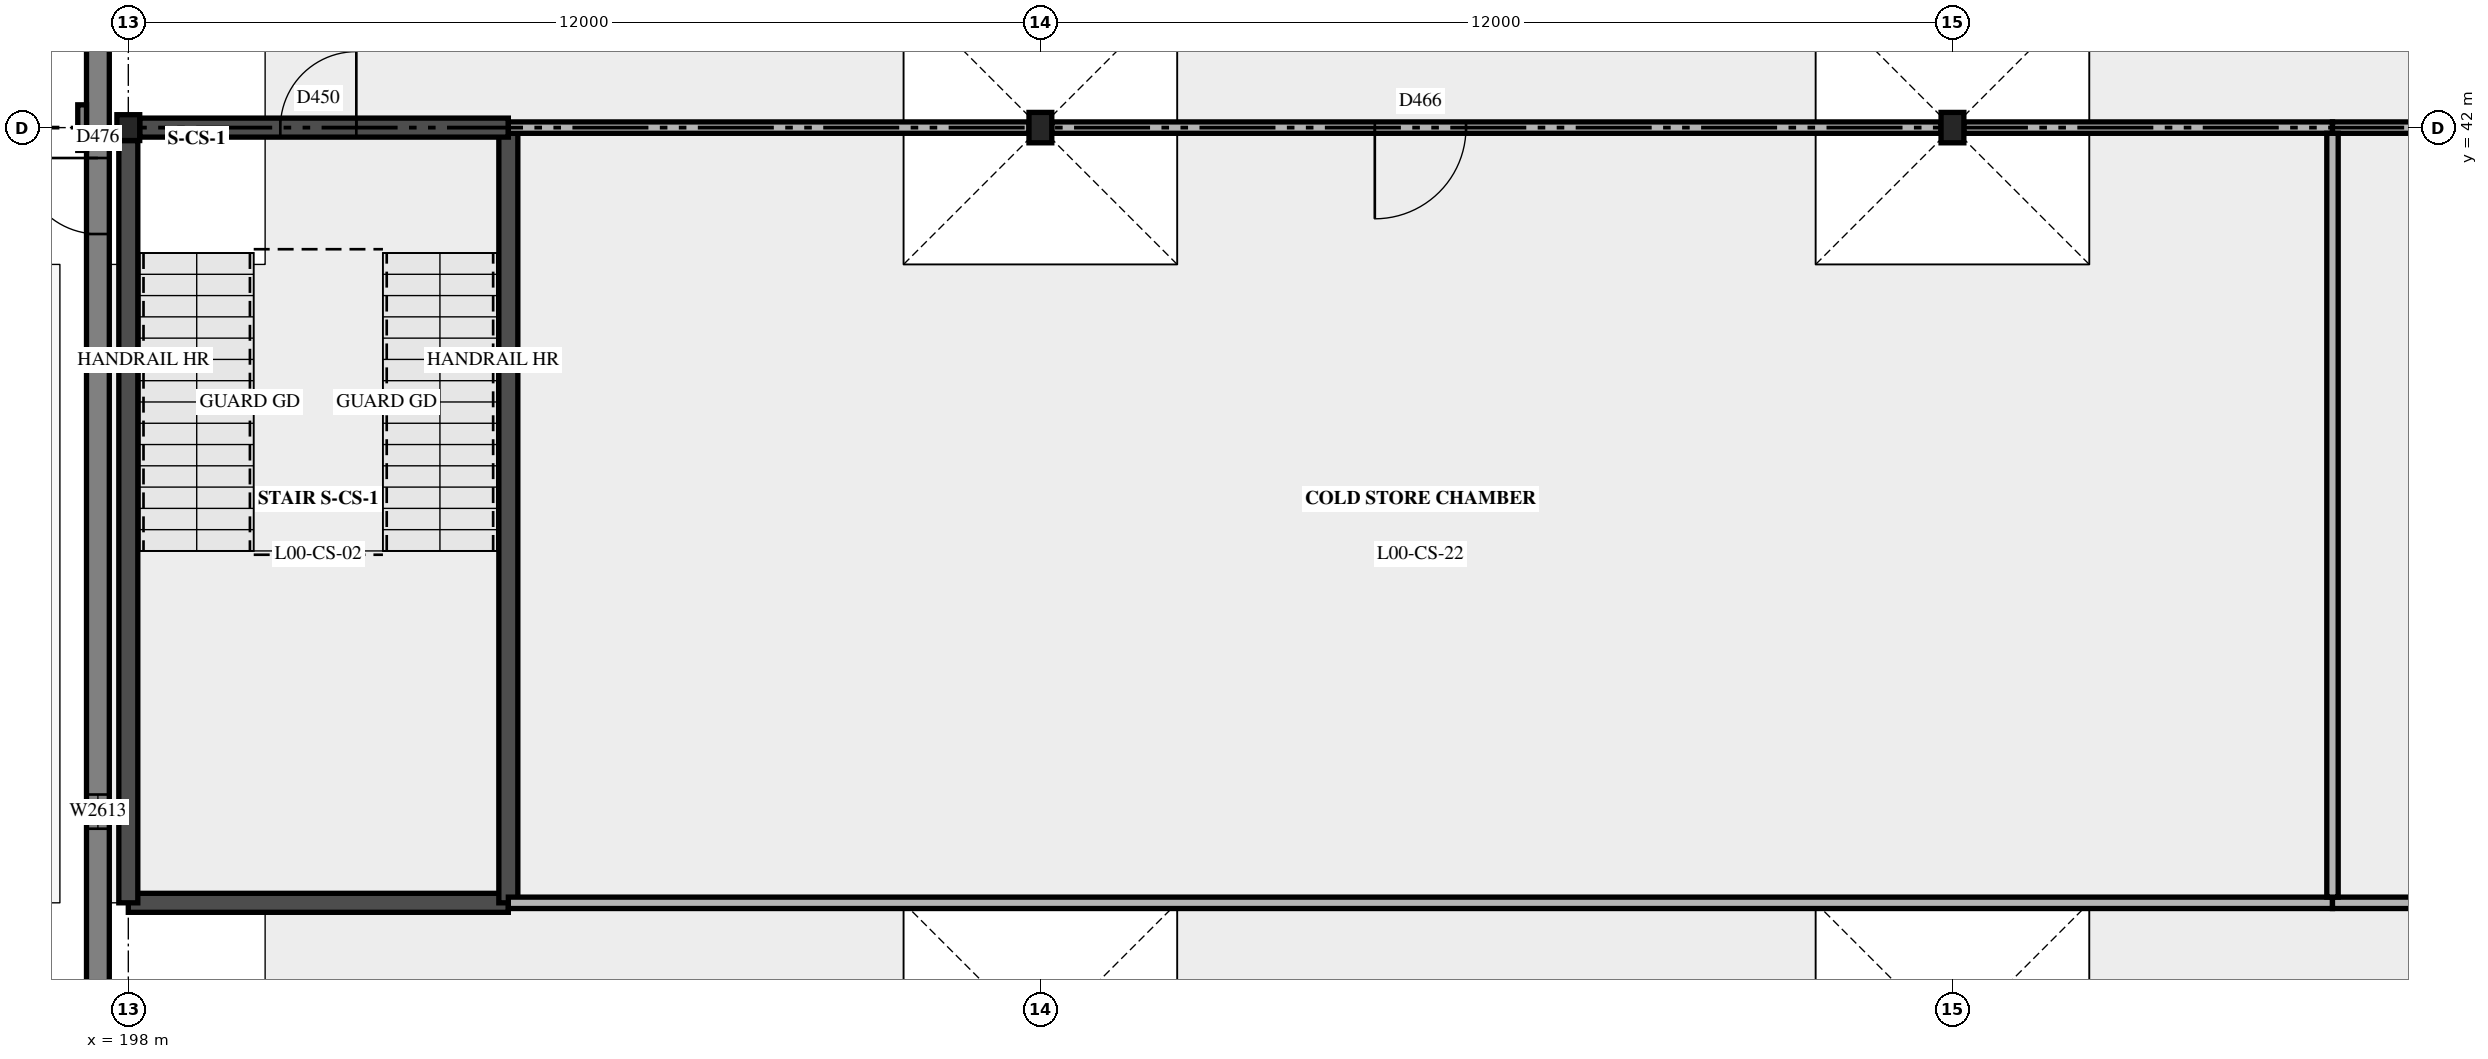
"""IFC4 building model, lengths in metres.
Left out: names, types, materials, properties, quantities, classifications, styles, units other than length and angle.
Written with IfcOpenShell. Run it as: python <this file> out.ifc"""

import sys

from ifc_helpers import new_model, si_unit, direction, frame, frame_2d, origin, origin_2d, place, context, subcontext, project, spatial, polyline, rectangle, i_section, outline, extrude, element, fill, save


model = new_model("IFC4")
c1 = context("Model", 3, precision=1e-05, world=origin(), true_north=direction((0.0, 1.0)))
c2 = subcontext(c1, "Body", "Model", "MODEL_VIEW")
j1 = project(units=[si_unit("LENGTHUNIT", "METRE"), si_unit("PLANEANGLEUNIT", "RADIAN")], contexts=[c1])
p1 = place(None, origin())
s1 = spatial("IfcSite", under=j1, at=p1, CompositionType="ELEMENT")
p2 = place(p1, origin())
s2 = spatial("IfcBuilding", under=s1, at=p2, CompositionType="ELEMENT")
p3 = place(p2, origin())
s3 = spatial("IfcBuildingStorey", under=s2, at=p3, CompositionType="ELEMENT", Elevation=0.0)
p4 = place(p3, frame((198.0, 42.0, 0.0), z_axis=(0.0, 0.0, 1.0), x_axis=(1.0, 0.0, 0.0)))
e1 = element("IfcColumn", 1, at=p4, inside=s3, PredefinedType="COLUMN", context=c2, shape_type="SweptSolid", body=[
    extrude(i_section(OverallWidth=0.3, OverallDepth=0.34, WebThickness=0.012, FlangeThickness=0.021, at=origin_2d()), origin(), (0.0, 0.0, 1.0), 5.4),
])
for number, where, z_axis, x_axis in (
    (2, (210.0, 42.0, 0.0), (0.0, 0.0, 1.0), (1.0, 0.0, 0.0)),
    (3, (222.0, 42.0, 0.0), (0.0, 0.0, 1.0), (1.0, 0.0, 0.0)),
):
    element("IfcColumn", number, at=place(p3, frame(where, z_axis=z_axis, x_axis=x_axis)), inside=s3, PredefinedType="COLUMN", context=c2, shape_type="SweptSolid", body=[
        extrude(i_section(OverallWidth=0.3, OverallDepth=0.4, WebThickness=0.013, FlangeThickness=0.024, at=origin_2d()), origin(), (0.0, 0.0, 1.0), 5.4),
    ])
p5 = place(p3, frame((198.0, 31.8, 0.0), z_axis=(0.0, 0.0, 1.0), x_axis=(1.0, 0.0, 0.0)))
e4 = element("IfcWall", 4, at=p5, inside=s3, PredefinedType="SHEAR", context=c2, shape_type="SweptSolid", body=[
    extrude(rectangle(XDim=5.0, YDim=0.25, at=frame_2d((2.5, 0.0))), origin(), (0.0, 0.0, 1.0), 5.4),
])
p6 = place(p3, frame((203.0, 31.8, 0.0), z_axis=(0.0, 0.0, 1.0), x_axis=(0.0, 1.0, 0.0)))
e5 = element("IfcWall", 5, at=p6, inside=s3, PredefinedType="SHEAR", context=c2, shape_type="SweptSolid", body=[
    extrude(rectangle(XDim=10.2, YDim=0.25, at=frame_2d((5.1, 0.0))), origin(), (0.0, 0.0, 1.0), 5.4),
])
p7 = place(p3, frame((198.15, 42.0, 0.0), z_axis=(0.0, 0.0, 1.0), x_axis=(1.0, 0.0, 0.0)))
e6 = element("IfcWall", 6, at=p7, inside=s3, PredefinedType="SHEAR", context=c2, shape_type="SweptSolid", body=[
    extrude(rectangle(XDim=4.85, YDim=0.25, at=frame_2d((2.425, 0.0))), origin(), (0.0, 0.0, 1.0), 5.4),
])
p8 = place(p7, frame((1.85, 0.0, 0.0)))
e7 = element("IfcOpeningElement", 7, at=p8, cuts=e6, PredefinedType="OPENING", context=c2, shape_type="SweptSolid", body=[
    extrude(rectangle(XDim=1.0, YDim=2.1, at=frame_2d((0.5, 1.05))), frame((0.0, 0.135, 0.0), z_axis=(0.0, -1.0, 0.0), x_axis=(1.0, 0.0, 0.0)), (0.0, 0.0, 1.0), 0.27),
])
p9 = place(p3, frame((198.0, 31.8, 0.0), z_axis=(0.0, 0.0, 1.0), x_axis=(0.0, 1.0, 0.0)))
e8 = element("IfcWall", 8, at=p9, inside=s3, PredefinedType="SHEAR", context=c2, shape_type="SweptSolid", body=[
    extrude(rectangle(XDim=10.03, YDim=0.25, at=frame_2d((5.015, 0.0))), origin(), (0.0, 0.0, 1.0), 5.4),
])
p10 = place(p9, frame((8.8, 0.0, 0.0)))
e9 = element("IfcOpeningElement", 9, at=p10, cuts=e8, PredefinedType="OPENING", context=c2, shape_type="SweptSolid", body=[
    extrude(rectangle(XDim=1.0, YDim=2.1, at=frame_2d((0.5, 1.05))), frame((0.0, 0.135, 0.0), z_axis=(0.0, -1.0, 0.0), x_axis=(1.0, 0.0, 0.0)), (0.0, 0.0, 1.0), 0.27),
])
p11 = place(p3, frame((197.6, 66.25, 0.0), z_axis=(0.0, 0.0, 1.0), x_axis=(0.0, -1.0, 0.0)))
e10 = element("IfcWall", 10, at=p11, inside=s3, PredefinedType="SOLIDWALL", context=c2, shape_type="SweptSolid", body=[
    extrude(rectangle(XDim=48.5, YDim=0.3, at=frame_2d((24.25, 0.0))), origin(), (0.0, 0.0, 1.0), 5.4),
])
p12 = place(p11, frame((25.65, 0.0, 0.0), z_axis=(0.0, 0.0, 1.0), x_axis=(-1.0, 0.0, 0.0)))
e11 = element("IfcOpeningElement", 11, at=p12, cuts=e10, PredefinedType="OPENING", context=c2, shape_type="SweptSolid", body=[
    extrude(rectangle(XDim=1.0, YDim=2.1, at=frame_2d((0.5, 1.05))), frame((0.0, 0.16, 0.0), z_axis=(0.0, -1.0, 0.0), x_axis=(1.0, 0.0, 0.0)), (0.0, 0.0, 1.0), 0.32),
])
p13 = place(p11, frame((37.85, 0.0, 0.0), z_axis=(0.0, 0.0, 1.0), x_axis=(-1.0, 0.0, 0.0)))
e12 = element("IfcOpeningElement", 12, at=p13, cuts=e10, PredefinedType="OPENING", context=c2, shape_type="SweptSolid", body=[
    extrude(rectangle(XDim=1.0, YDim=2.1, at=frame_2d((0.5, 1.05))), frame((0.0, 0.16, 0.0), z_axis=(0.0, -1.0, 0.0), x_axis=(1.0, 0.0, 0.0)), (0.0, 0.0, 1.0), 0.32),
])
p14 = place(p11, frame((9.025, 0.0, 1.8)))
e13 = element("IfcOpeningElement", 13, at=p14, cuts=e10, PredefinedType="OPENING", context=c2, shape_type="SweptSolid", body=[
    extrude(rectangle(XDim=0.45, YDim=2.4, at=frame_2d((0.225, 1.2))), frame((0.0, 0.16, 0.0), z_axis=(0.0, -1.0, 0.0), x_axis=(1.0, 0.0, 0.0)), (0.0, 0.0, 1.0), 0.32),
])
p15 = place(p11, frame((33.025, 0.0, 1.8)))
e14 = element("IfcOpeningElement", 14, at=p15, cuts=e10, PredefinedType="OPENING", context=c2, shape_type="SweptSolid", body=[
    extrude(rectangle(XDim=0.45, YDim=2.4, at=frame_2d((0.225, 1.2))), frame((0.0, 0.16, 0.0), z_axis=(0.0, -1.0, 0.0), x_axis=(1.0, 0.0, 0.0)), (0.0, 0.0, 1.0), 0.32),
])
p16 = place(p11, frame((45.025, 0.0, 1.8)))
e15 = element("IfcOpeningElement", 15, at=p16, cuts=e10, PredefinedType="OPENING", context=c2, shape_type="SweptSolid", body=[
    extrude(rectangle(XDim=0.45, YDim=2.4, at=frame_2d((0.225, 1.2))), frame((0.0, 0.16, 0.0), z_axis=(0.0, -1.0, 0.0), x_axis=(1.0, 0.0, 0.0)), (0.0, 0.0, 1.0), 0.32),
])
p17 = place(p3, frame((197.393, 42.3, 0.0), z_axis=(0.0, 0.0, 1.0), x_axis=(0.0, -1.0, 0.0)))
e16 = element("IfcWall", 16, at=p17, inside=s3, PredefinedType="SOLIDWALL", context=c2, shape_type="SweptSolid", body=[
    extrude(rectangle(XDim=0.6, YDim=0.115, at=frame_2d((0.3, 0.0))), origin(), (0.0, 0.0, 1.0), 5.4),
])
for number, where, z_axis, x_axis in (
    (17, (203.0, 31.8, 0.0), (0.0, 0.0, 1.0), (1.0, 0.0, 0.0)),
    (18, (227.0, 31.8, 0.0), (0.0, 0.0, 1.0), (1.0, 0.0, 0.0)),
):
    element("IfcWall", number, at=place(p3, frame(where, z_axis=z_axis, x_axis=x_axis)), inside=s3, PredefinedType="PARTITIONING", context=c2, shape_type="SweptSolid", body=[
        extrude(outline(polyline([(0.0, 0.0), (24.0, 0.0), (24.0, 5.15), (23.905, 5.15), (23.9, 4.63), (23.7, 4.63), (23.695, 5.15), (21.505, 5.15), (21.5, 4.63), (21.3, 4.63), (21.295, 5.15), (19.1, 5.15), (19.095, 4.68), (18.905, 4.68), (18.9, 5.15), (16.705, 5.15), (16.7, 4.63), (16.5, 4.63), (16.495, 5.15), (14.305, 5.15), (14.3, 4.63), (14.1, 4.63), (14.095, 5.15), (11.905, 5.15), (11.9, 4.63), (11.7, 4.63), (11.695, 5.15), (9.505, 5.15), (9.5, 4.63), (9.3, 4.63), (9.295, 5.15), (7.1, 5.15), (7.095, 4.68), (6.905, 4.68), (6.9, 5.15), (4.705, 5.15), (4.7, 4.63), (4.5, 4.63), (4.495, 5.15), (2.305, 5.15), (2.3, 4.63), (2.1, 4.63), (2.095, 5.15), (0.0, 5.15), (0.0, 0.0)])), frame((0.0, 0.075, 0.0), z_axis=(0.0, -1.0, 0.0), x_axis=(1.0, 0.0, 0.0)), (0.0, 0.0, 1.0), 0.15),
    ])
p18 = place(p3, frame((203.0, 42.0, 0.0), z_axis=(0.0, 0.0, 1.0), x_axis=(1.0, 0.0, 0.0)))
e19 = element("IfcWall", 19, at=p18, inside=s3, PredefinedType="PARTITIONING", context=c2, shape_type="SweptSolid", body=[
    extrude(rectangle(XDim=6.85, YDim=0.15, at=frame_2d((3.425, 0.0))), origin(), (0.0, 0.0, 1.0), 4.63),
])
p19 = place(p3, frame((210.15, 42.0, 0.0), z_axis=(0.0, 0.0, 1.0), x_axis=(1.0, 0.0, 0.0)))
e20 = element("IfcWall", 20, at=p19, inside=s3, PredefinedType="PARTITIONING", context=c2, shape_type="SweptSolid", body=[
    extrude(rectangle(XDim=11.7, YDim=0.15, at=frame_2d((5.85, 0.0))), origin(), (0.0, 0.0, 1.0), 4.63),
])
p20 = place(p19, frame((4.25, 0.0, 0.0)))
e21 = element("IfcOpeningElement", 21, at=p20, cuts=e20, PredefinedType="OPENING", context=c2, shape_type="SweptSolid", body=[
    extrude(rectangle(XDim=1.2, YDim=2.4, at=frame_2d((0.6, 1.2))), frame((0.0, 0.085, 0.0), z_axis=(0.0, -1.0, 0.0), x_axis=(1.0, 0.0, 0.0)), (0.0, 0.0, 1.0), 0.17),
])
p21 = place(p3, frame((222.15, 42.0, 0.0), z_axis=(0.0, 0.0, 1.0), x_axis=(1.0, 0.0, 0.0)))
e22 = element("IfcWall", 22, at=p21, inside=s3, PredefinedType="PARTITIONING", context=c2, shape_type="SweptSolid", body=[
    extrude(rectangle(XDim=4.85, YDim=0.15, at=frame_2d((2.425, 0.0))), origin(), (0.0, 0.0, 1.0), 4.63),
])
p22 = place(p3, frame((227.0, 42.0, 0.0), z_axis=(0.0, 0.0, 1.0), x_axis=(1.0, 0.0, 0.0)))
e23 = element("IfcWall", 23, at=p22, inside=s3, PredefinedType="PARTITIONING", context=c2, shape_type="SweptSolid", body=[
    extrude(rectangle(XDim=6.85, YDim=0.15, at=frame_2d((3.425, 0.0))), origin(), (0.0, 0.0, 1.0), 4.63),
])
p23 = place(p3, frame((227.0, 31.875, 0.0), z_axis=(0.0, 0.0, 1.0), x_axis=(0.0, 1.0, 0.0)))
e24 = element("IfcWall", 24, at=p23, inside=s3, PredefinedType="PARTITIONING", context=c2, shape_type="SweptSolid", body=[
    extrude(outline(polyline([(0.0, 0.0), (10.05, 0.0), (10.05, 4.63), (10.025, 4.63), (10.02, 5.15), (0.0, 5.15), (0.0, 0.0)])), frame((0.0, 0.075, 0.0), z_axis=(0.0, -1.0, 0.0), x_axis=(1.0, 0.0, 0.0)), (0.0, 0.0, 1.0), 0.15),
])
p24 = place(p12, origin())
e25 = element("IfcDoor", 25, at=p24, inside=s3, OperationType="SINGLE_SWING_RIGHT", PredefinedType="DOOR", context=c2, shape_type="SweptSolid", body=[
    extrude(rectangle(XDim=1.0, YDim=2.1, at=frame_2d((0.5, 1.05))), frame((0.0, 0.025, 0.0), z_axis=(0.0, -1.0, 0.0), x_axis=(1.0, 0.0, 0.0)), (0.0, 0.0, 1.0), 0.05),
])
fill(e11, e25)
p25 = place(p15, origin())
e26 = element("IfcWindow", 26, at=p25, inside=s3, PartitioningType="SINGLE_PANEL", PredefinedType="WINDOW", context=c2, shape_type="SweptSolid", body=[
    extrude(rectangle(XDim=0.45, YDim=2.4, at=frame_2d((0.225, 1.2))), frame((0.0, 0.03, 0.0), z_axis=(0.0, -1.0, 0.0), x_axis=(1.0, 0.0, 0.0)), (0.0, 0.0, 1.0), 0.06),
])
fill(e14, e26)
p26 = place(p8, origin())
e27 = element("IfcDoor", 27, at=p26, inside=s3, OperationType="SINGLE_SWING_RIGHT", PredefinedType="DOOR", context=c2, shape_type="SweptSolid", body=[
    extrude(rectangle(XDim=1.0, YDim=2.1, at=frame_2d((0.5, 1.05))), frame((0.0, 0.025, 0.0), z_axis=(0.0, -1.0, 0.0), x_axis=(1.0, 0.0, 0.0)), (0.0, 0.0, 1.0), 0.05),
])
fill(e7, e27)
p27 = place(p20, origin())
e28 = element("IfcDoor", 28, at=p27, inside=s3, OperationType="SINGLE_SWING_RIGHT", PredefinedType="DOOR", context=c2, shape_type="SweptSolid", body=[
    extrude(rectangle(XDim=1.2, YDim=2.4, at=frame_2d((0.6, 1.2))), frame((0.0, 0.025, 0.0), z_axis=(0.0, -1.0, 0.0), x_axis=(1.0, 0.0, 0.0)), (0.0, 0.0, 1.0), 0.05),
])
fill(e21, e28)
save(model, sys.argv[1])
